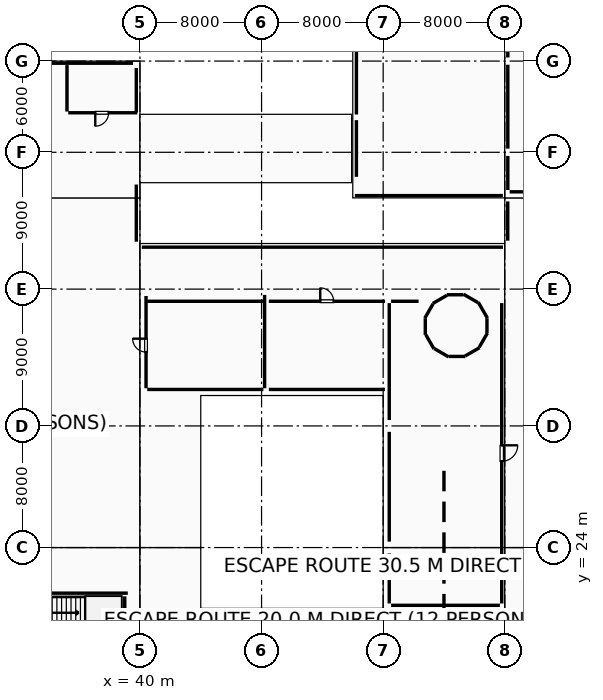
"""IFC4 building model, lengths in metres.
Left out: names, types, materials, properties, quantities, classifications, styles, units other than length and angle.
Written with IfcOpenShell. Run it as: python <this file> out.ifc"""

import sys

from ifc_helpers import new_model, si_unit, direction, frame, frame_2d, origin, origin_2d, place, context, subcontext, project, spatial, rectangle, hollow_rectangle, i_section, extrude, element, fill, save


model = new_model("IFC4")
c1 = context("Model", 3, precision=1e-05, world=origin(), true_north=direction((0.0, 1.0)))
c2 = subcontext(c1, "Body", "Model", "MODEL_VIEW")
j1 = project(units=[si_unit("LENGTHUNIT", "METRE"), si_unit("PLANEANGLEUNIT", "RADIAN")], contexts=[c1])
p1 = place(None, origin())
s1 = spatial("IfcSite", under=j1, at=p1, CompositionType="ELEMENT")
p2 = place(p1, origin())
s2 = spatial("IfcBuilding", under=s1, at=p2, CompositionType="ELEMENT")
p3 = place(p2, frame((0.0, 0.0, 5.4)))
s3 = spatial("IfcBuildingStorey", under=s2, at=p3, CompositionType="ELEMENT", Elevation=5.4)
for number, where, z_axis, x_axis in (
    (1, (40.0, 24.0, 0.0), (0.0, 0.0, 1.0), (1.0, 0.0, 0.0)),
    (2, (40.0, 32.0, 0.0), (0.0, 0.0, 1.0), (1.0, 0.0, 0.0)),
    (3, (40.0, 41.0, 0.0), (0.0, 0.0, 1.0), (1.0, 0.0, 0.0)),
    (4, (40.0, 50.0, 0.0), (0.0, 0.0, 1.0), (1.0, 0.0, 0.0)),
    (5, (40.0, 56.0, 0.0), (0.0, 0.0, 1.0), (1.0, 0.0, 0.0)),
):
    element("IfcColumn", number, at=place(p3, frame(where, z_axis=z_axis, x_axis=x_axis)), inside=s3, PredefinedType="COLUMN", context=c2, shape_type="SweptSolid", body=[
        extrude(rectangle(XDim=0.9, YDim=0.9, at=origin_2d()), origin(), (0.0, 0.0, 1.0), 4.8),
    ])
for number, where, z_axis, x_axis in (
    (6, (48.0, 41.0, 0.0), (0.0, 0.0, 1.0), (1.0, 0.0, 0.0)),
    (7, (56.0, 24.0, 0.0), (0.0, 0.0, 1.0), (1.0, 0.0, 0.0)),
    (8, (56.0, 32.0, 0.0), (0.0, 0.0, 1.0), (1.0, 0.0, 0.0)),
    (9, (56.0, 41.0, 0.0), (0.0, 0.0, 1.0), (1.0, 0.0, 0.0)),
):
    element("IfcColumn", number, at=place(p3, frame(where, z_axis=z_axis, x_axis=x_axis)), inside=s3, PredefinedType="COLUMN", context=c2, shape_type="SweptSolid", body=[
        extrude(rectangle(XDim=0.75, YDim=0.75, at=origin_2d()), origin(), (0.0, 0.0, 1.0), 4.8),
    ])
for number, where, z_axis, x_axis in (
    (10, (56.0, 50.0, 0.0), (0.0, 0.0, 1.0), (1.0, 0.0, 0.0)),
    (11, (56.0, 56.0, 0.0), (0.0, 0.0, 1.0), (1.0, 0.0, 0.0)),
):
    element("IfcColumn", number, at=place(p3, frame(where, z_axis=z_axis, x_axis=x_axis)), inside=s3, PredefinedType="COLUMN", context=c2, shape_type="SweptSolid", body=[
        extrude(rectangle(XDim=0.9, YDim=0.9, at=origin_2d()), origin(), (0.0, 0.0, 1.0), 4.8),
    ])
p4 = place(p3, frame((64.0, 50.0, 0.0), z_axis=(0.0, 0.0, 1.0), x_axis=(1.0, 0.0, 0.0)))
e12 = element("IfcColumn", 12, at=p4, inside=s3, PredefinedType="COLUMN", context=c2, shape_type="SweptSolid", body=[
    extrude(hollow_rectangle(XDim=0.45, YDim=0.45, WallThickness=0.02, at=origin_2d()), origin(), (0.0, 0.0, 1.0), 4.8),
])
p5 = place(p3, frame((64.0, 56.0, 0.0), z_axis=(0.0, 0.0, 1.0), x_axis=(1.0, 0.0, 0.0)))
e13 = element("IfcColumn", 13, at=p5, inside=s3, PredefinedType="COLUMN", context=c2, shape_type="SweptSolid", body=[
    extrude(i_section(OverallWidth=0.25, OverallDepth=0.45, WebThickness=0.011, FlangeThickness=0.014, FilletRadius=0.015, at=origin_2d()), origin(), (0.0, 0.0, 1.0), 4.8),
])
for number, where, z_axis, x_axis in (
    (14, (40.0, 48.2, 0.0), (0.0, 0.0, 1.0), (1.0, 0.0, 0.0)),
    (15, (54.0, 48.2, 0.0), (0.0, 0.0, 1.0), (1.0, 0.0, 0.0)),
    (16, (40.0, 52.3, 0.0), (0.0, 0.0, 1.0), (1.0, 0.0, 0.0)),
    (17, (54.0, 52.3, 0.0), (0.0, 0.0, 1.0), (1.0, 0.0, 0.0)),
):
    element("IfcColumn", number, at=place(p3, frame(where, z_axis=z_axis, x_axis=x_axis)), inside=s3, PredefinedType="COLUMN", context=c2, shape_type="SweptSolid", body=[
        extrude(i_section(OverallWidth=0.25, OverallDepth=0.35, WebThickness=0.01, FlangeThickness=0.012, FilletRadius=0.012, at=origin_2d()), origin(), (0.0, 0.0, 1.0), 4.8),
    ])
p6 = place(p3, frame((64.0, 47.0, 0.0), z_axis=(0.0, 0.0, 1.0), x_axis=(1.0, 0.0, 0.0)))
e18 = element("IfcColumn", 18, at=p6, inside=s3, PredefinedType="COLUMN", context=c2, shape_type="SweptSolid", body=[
    extrude(i_section(OverallWidth=0.25, OverallDepth=0.45, WebThickness=0.011, FlangeThickness=0.014, FilletRadius=0.015, at=origin_2d()), origin(), (0.0, 0.0, 1.0), 4.8),
])
p7 = place(p3, frame((39.76, 47.88, 0.0), z_axis=(0.0, 0.0, 1.0), x_axis=(0.0, -1.0, 0.0)))
e19 = element("IfcWall", 19, at=p7, inside=s3, PredefinedType="PARAPET", context=c2, shape_type="SweptSolid", body=[
    extrude(rectangle(XDim=3.76, YDim=0.18, at=frame_2d((1.88, 0.0))), origin(), (0.0, 0.0, 1.0), 0.88),
])
p8 = place(p3, frame((40.12, 43.76, 0.0), z_axis=(0.0, 0.0, 1.0), x_axis=(1.0, 0.0, 0.0)))
e20 = element("IfcWall", 20, at=p8, inside=s3, PredefinedType="PARAPET", context=c2, shape_type="SweptSolid", body=[
    extrude(rectangle(XDim=23.76, YDim=0.18, at=frame_2d((11.88, 0.0))), origin(), (0.0, 0.0, 1.0), 0.88),
])
p9 = place(p3, frame((64.195, 44.185, 0.0), z_axis=(0.0, 0.0, 1.0), x_axis=(0.0, 1.0, 0.0)))
e21 = element("IfcWall", 21, at=p9, inside=s3, PredefinedType="STANDARD", context=c2, shape_type="SweptSolid", body=[
    extrude(rectangle(XDim=2.582, YDim=0.35, at=frame_2d((1.291, 0.0))), origin(), (0.0, 0.0, 1.0), 3.725),
])
p10 = place(p3, frame((63.876, 47.15, 0.0), z_axis=(0.0, 0.0, 1.0), x_axis=(-1.0, 0.0, 0.0)))
e22 = element("IfcWall", 22, at=p10, inside=s3, PredefinedType="ELEMENTEDWALL", context=c2, shape_type="SweptSolid", body=[
    extrude(rectangle(XDim=9.736, YDim=0.26, at=frame_2d((4.868, 0.0))), origin(), (0.0, 0.0, 1.0), 4.54),
])
p11 = place(p10, frame((4.426, 0.0, 0.95)))
e23 = element("IfcOpeningElement", 23, at=p11, cuts=e22, PredefinedType="OPENING", context=c2, shape_type="SweptSolid", body=[
    extrude(rectangle(XDim=0.9, YDim=2.1, at=frame_2d((0.45, 1.05))), frame((0.0, 0.14, 0.0), z_axis=(0.0, -1.0, 0.0), x_axis=(1.0, 0.0, 0.0)), (0.0, 0.0, 1.0), 0.28),
])
p12 = place(p3, frame((54.24, 48.385, 0.0), z_axis=(0.0, 0.0, 1.0), x_axis=(0.0, 1.0, 0.0)))
e24 = element("IfcWall", 24, at=p12, inside=s3, PredefinedType="PARAPET", context=c2, shape_type="SweptSolid", body=[
    extrude(rectangle(XDim=3.73, YDim=0.18, at=frame_2d((1.865, 0.0))), origin(), (0.0, 0.0, 1.0), 0.88),
])
p13 = place(p3, frame((54.24, 52.485, 0.0), z_axis=(0.0, 0.0, 1.0), x_axis=(0.0, 1.0, 0.0)))
e25 = element("IfcWall", 25, at=p13, inside=s3, PredefinedType="PARAPET", context=c2, shape_type="SweptSolid", body=[
    extrude(rectangle(XDim=13.03, YDim=0.18, at=frame_2d((6.515, 0.0))), origin(), (0.0, 0.0, 1.0), 0.88),
])
p14 = place(p3, frame((32.383, 55.86, 0.0), z_axis=(0.0, 0.0, 1.0), x_axis=(1.0, 0.0, 0.0)))
e26 = element("IfcWall", 26, at=p14, inside=s3, PredefinedType="ELEMENTEDWALL", context=c2, shape_type="SweptSolid", body=[
    extrude(rectangle(XDim=7.159, YDim=0.24, at=frame_2d((3.58, 0.0))), origin(), (0.0, 0.0, 1.0), 3.675),
])
p15 = place(p3, frame((39.76, 55.54, 0.0), z_axis=(0.0, 0.0, 1.0), x_axis=(0.0, -1.0, 0.0)))
e27 = element("IfcWall", 27, at=p15, inside=s3, PredefinedType="PARAPET", context=c2, shape_type="SweptSolid", body=[
    extrude(rectangle(XDim=2.92, YDim=0.18, at=frame_2d((1.46, 0.0))), origin(), (0.0, 0.0, 1.0), 0.88),
])
p16 = place(p3, frame((39.2, 21.0, 0.0), z_axis=(0.0, 0.0, 1.0), x_axis=(-1.0, 0.0, 0.0)))
e28 = element("IfcWall", 28, at=p16, inside=s3, PredefinedType="SHEAR", context=c2, shape_type="SweptSolid", body=[
    extrude(rectangle(XDim=8.926, YDim=0.4, at=frame_2d((4.463, 0.0))), origin(), (0.0, 0.0, 1.0), 4.54),
])
p17 = place(p3, frame((39.0, 12.41, 0.0), z_axis=(0.0, 0.0, 1.0), x_axis=(0.0, 1.0, 0.0)))
e29 = element("IfcWall", 29, at=p17, inside=s3, PredefinedType="SHEAR", context=c2, shape_type="SweptSolid", body=[
    extrude(rectangle(XDim=8.38, YDim=0.4, at=frame_2d((4.19, 0.0))), origin(), (0.0, 0.0, 1.0), 4.54),
])
p18 = place(p3, frame((62.861, 39.086, 0.0), z_axis=(0.0, 0.0, 1.0), x_axis=(-0.499930512259, 0.866065518833, 0.0)))
e30 = element("IfcWall", 30, at=p18, inside=s3, PredefinedType="SHEAR", context=c2, shape_type="SweptSolid", body=[
    extrude(rectangle(XDim=1.219, YDim=0.35, at=frame_2d((0.609, 0.0))), origin(), (0.0, 0.0, 1.0), 4.54),
])
for number, where, z_axis, x_axis in (
    (31, (62.233, 40.115, 0.0), (0.0, 0.0, 1.0), (-0.866, 0.5, 0.0)),
    (32, (61.283, 40.628, 0.0), (0.0, 0.0, 1.0), (-1.0, 0.0, 0.0)),
    (33, (60.205, 40.598, 0.0), (0.0, 0.0, 1.0), (-0.866, -0.5, 0.0)),
    (34, (59.285, 40.033, 0.0), (0.0, 0.0, 1.0), (-0.5, -0.866, 0.0)),
    (35, (58.771, 39.083, 0.0), (0.0, 0.0, 1.0), (0.0, -1.0, 0.0)),
    (36, (58.802, 38.004, 0.0), (0.0, 0.0, 1.0), (0.5, -0.866, 0.0)),
):
    element("IfcWall", number, at=place(p3, frame(where, z_axis=z_axis, x_axis=x_axis)), inside=s3, PredefinedType="SHEAR", context=c2, shape_type="SweptSolid", body=[
        extrude(rectangle(XDim=1.093, YDim=0.35, at=frame_2d((0.546, 0.0))), origin(), (0.0, 0.0, 1.0), 4.54),
    ])
p19 = place(p3, frame((59.367, 37.085, 0.0), z_axis=(0.0, 0.0, 1.0), x_axis=(0.866021955858, -0.500005971936, 0.0)))
e37 = element("IfcWall", 37, at=p19, inside=s3, PredefinedType="SHEAR", context=c2, shape_type="SweptSolid", body=[
    extrude(rectangle(XDim=1.093, YDim=0.35, at=frame_2d((0.547, 0.0))), origin(), (0.0, 0.0, 1.0), 4.54),
])
for number, where, z_axis, x_axis in (
    (38, (60.316, 36.572, 0.0), (0.0, 0.0, 1.0), (1.0, 0.0, 0.0)),
    (39, (61.396, 36.602, 0.0), (0.0, 0.0, 1.0), (0.866, 0.5, 0.0)),
    (40, (62.315, 37.167, 0.0), (0.0, 0.0, 1.0), (0.5, 0.866, 0.0)),
):
    element("IfcWall", number, at=place(p3, frame(where, z_axis=z_axis, x_axis=x_axis)), inside=s3, PredefinedType="SHEAR", context=c2, shape_type="SweptSolid", body=[
        extrude(rectangle(XDim=1.093, YDim=0.35, at=frame_2d((0.546, 0.0))), origin(), (0.0, 0.0, 1.0), 4.54),
    ])
p20 = place(p3, frame((62.828, 38.116, 0.0), z_axis=(0.0, 0.0, 1.0), x_axis=(0.0, 1.0, 0.0)))
e41 = element("IfcWall", 41, at=p20, inside=s3, PredefinedType="SHEAR", context=c2, shape_type="SweptSolid", body=[
    extrude(rectangle(XDim=0.967, YDim=0.35, at=frame_2d((0.483, 0.0))), origin(), (0.0, 0.0, 1.0), 4.54),
])
p21 = place(p3, frame((40.52, 19.6, 0.0), z_axis=(0.0, 0.0, 1.0), x_axis=(1.0, 0.0, 0.0)))
e42 = element("IfcWall", 42, at=p21, inside=s3, PredefinedType="PARTITIONING", context=c2, shape_type="SweptSolid", body=[
    extrude(rectangle(XDim=23.16, YDim=0.2, at=frame_2d((11.58, 0.0))), origin(), (0.0, 0.0, 1.0), 4.53),
])
p22 = place(p3, frame((40.4, 16.465, 0.0), z_axis=(0.0, 0.0, 1.0), x_axis=(0.0, 1.0, 0.0)))
e43 = element("IfcWall", 43, at=p22, inside=s3, PredefinedType="PARTITIONING", context=c2, shape_type="SweptSolid", body=[
    extrude(rectangle(XDim=3.015, YDim=0.2, at=frame_2d((1.507, 0.0))), origin(), (0.0, 0.0, 1.0), 4.53),
])
p23 = place(p3, frame((56.52, 40.2, 0.0), z_axis=(0.0, 0.0, 1.0), x_axis=(1.0, 0.0, 0.0)))
e44 = element("IfcWall", 44, at=p23, inside=s3, PredefinedType="PARTITIONING", context=c2, shape_type="SweptSolid", body=[
    extrude(rectangle(XDim=1.81, YDim=0.2, at=frame_2d((0.905, 0.0))), origin(), (0.0, 0.0, 1.0), 4.53),
])
p24 = place(p3, frame((63.8, 40.08, 0.0), z_axis=(0.0, 0.0, 1.0), x_axis=(0.0, -1.0, 0.0)))
e45 = element("IfcWall", 45, at=p24, inside=s3, PredefinedType="PARTITIONING", context=c2, shape_type="SweptSolid", body=[
    extrude(rectangle(XDim=19.76, YDim=0.2, at=frame_2d((9.88, 0.0))), origin(), (0.0, 0.0, 1.0), 3.72),
])
p25 = place(p24, frame((9.355, 0.0, 0.0)))
e46 = element("IfcOpeningElement", 46, at=p25, cuts=e45, PredefinedType="OPENING", context=c2, shape_type="SweptSolid", body=[
    extrude(rectangle(XDim=1.05, YDim=2.15, at=frame_2d((0.525, 1.075))), frame((0.0, 0.11, 0.0), z_axis=(0.0, -1.0, 0.0), x_axis=(1.0, 0.0, 0.0)), (0.0, 0.0, 1.0), 0.22),
])
p26 = place(p3, frame((63.68, 20.2, 0.0), z_axis=(0.0, 0.0, 1.0), x_axis=(-1.0, 0.0, 0.0)))
e47 = element("IfcWall", 47, at=p26, inside=s3, PredefinedType="PARTITIONING", context=c2, shape_type="SweptSolid", body=[
    extrude(rectangle(XDim=7.16, YDim=0.2, at=frame_2d((3.58, 0.0))), origin(), (0.0, 0.0, 1.0), 4.53),
])
p27 = place(p3, frame((56.4, 20.32, 0.0), z_axis=(0.0, 0.0, 1.0), x_axis=(0.0, 1.0, 0.0)))
e48 = element("IfcWall", 48, at=p27, inside=s3, PredefinedType="PARTITIONING", context=c2, shape_type="SweptSolid", body=[
    extrude(rectangle(XDim=3.29, YDim=0.2, at=frame_2d((1.645, 0.0))), origin(), (0.0, 0.0, 1.0), 4.53),
])
p28 = place(p3, frame((56.4, 24.39, 0.0), z_axis=(0.0, 0.0, 1.0), x_axis=(0.0, 1.0, 0.0)))
e49 = element("IfcWall", 49, at=p28, inside=s3, PredefinedType="PARTITIONING", context=c2, shape_type="SweptSolid", body=[
    extrude(rectangle(XDim=7.22, YDim=0.2, at=frame_2d((3.61, 0.0))), origin(), (0.0, 0.0, 1.0), 3.52),
])
p29 = place(p3, frame((56.4, 32.39, 0.0), z_axis=(0.0, 0.0, 1.0), x_axis=(0.0, 1.0, 0.0)))
e50 = element("IfcWall", 50, at=p29, inside=s3, PredefinedType="PARTITIONING", context=c2, shape_type="SweptSolid", body=[
    extrude(rectangle(XDim=7.69, YDim=0.2, at=frame_2d((3.845, 0.0))), origin(), (0.0, 0.0, 1.0), 3.67),
])
p30 = place(p3, frame((71.66, 47.4, 0.0), z_axis=(0.0, 0.0, 1.0), x_axis=(-1.0, 0.0, 0.0)))
e51 = element("IfcWall", 51, at=p30, inside=s3, PredefinedType="PARTITIONING", context=c2, shape_type="SweptSolid", body=[
    extrude(rectangle(XDim=7.34, YDim=0.2, at=frame_2d((3.67, 0.0))), origin(), (0.0, 0.0, 1.0), 3.72),
])
p31 = place(p3, frame((64.2, 47.52, 0.0), z_axis=(0.0, 0.0, 1.0), x_axis=(0.0, 1.0, 0.0)))
e52 = element("IfcWall", 52, at=p31, inside=s3, PredefinedType="PARTITIONING", context=c2, shape_type="SweptSolid", body=[
    extrude(rectangle(XDim=2.24, YDim=0.2, at=frame_2d((1.12, 0.0))), origin(), (0.0, 0.0, 1.0), 3.92),
])
p32 = place(p3, frame((64.2, 50.24, 0.0), z_axis=(0.0, 0.0, 1.0), x_axis=(0.0, 1.0, 0.0)))
e53 = element("IfcWall", 53, at=p32, inside=s3, PredefinedType="PARTITIONING", context=c2, shape_type="SweptSolid", body=[
    extrude(rectangle(XDim=5.52, YDim=0.2, at=frame_2d((2.76, 0.0))), origin(), (0.0, 0.0, 1.0), 3.97),
])
p33 = place(p3, frame((64.2, 56.24, 0.0), z_axis=(0.0, 0.0, 1.0), x_axis=(0.0, 1.0, 0.0)))
e54 = element("IfcWall", 54, at=p33, inside=s3, PredefinedType="PARTITIONING", context=c2, shape_type="SweptSolid", body=[
    extrude(rectangle(XDim=8.52, YDim=0.2, at=frame_2d((4.26, 0.0))), origin(), (0.0, 0.0, 1.0), 4.02),
])
p34 = place(p3, frame((40.48, 40.2, 0.0), z_axis=(0.0, 0.0, 1.0), x_axis=(1.0, 0.0, 0.0)))
e55 = element("IfcWall", 55, at=p34, inside=s3, PredefinedType="PARTITIONING", context=c2, shape_type="SweptSolid", body=[
    extrude(rectangle(XDim=7.64, YDim=0.12, at=frame_2d((3.82, 0.0))), origin(), (0.0, 0.0, 1.0), 4.53),
])
p35 = place(p3, frame((48.2, 40.621, 0.0), z_axis=(0.0, 0.0, 1.0), x_axis=(0.0, -1.0, 0.0)))
e56 = element("IfcWall", 56, at=p35, inside=s3, PredefinedType="PARTITIONING", context=c2, shape_type="SweptSolid", body=[
    extrude(rectangle(XDim=6.141, YDim=0.12, at=frame_2d((3.071, 0.0))), origin(), (0.0, 0.0, 1.0), 4.53),
])
p36 = place(p3, frame((48.12, 34.4, 0.0), z_axis=(0.0, 0.0, 1.0), x_axis=(-1.0, 0.0, 0.0)))
e57 = element("IfcWall", 57, at=p36, inside=s3, PredefinedType="PARTITIONING", context=c2, shape_type="SweptSolid", body=[
    extrude(rectangle(XDim=7.64, YDim=0.12, at=frame_2d((3.82, 0.0))), origin(), (0.0, 0.0, 1.0), 4.53),
])
p37 = place(p3, frame((40.4, 34.48, 0.0), z_axis=(0.0, 0.0, 1.0), x_axis=(0.0, 1.0, 0.0)))
e58 = element("IfcWall", 58, at=p37, inside=s3, PredefinedType="PARTITIONING", context=c2, shape_type="SweptSolid", body=[
    extrude(rectangle(XDim=6.066, YDim=0.12, at=frame_2d((3.033, 0.0))), origin(), (0.0, 0.0, 1.0), 4.53),
])
p38 = place(p37, frame((2.38, 0.0, 0.0)))
e59 = element("IfcOpeningElement", 59, at=p38, cuts=e58, PredefinedType="OPENING", context=c2, shape_type="SweptSolid", body=[
    extrude(rectangle(XDim=0.88, YDim=2.1, at=frame_2d((0.44, 1.05))), frame((0.0, 0.07, 0.0), z_axis=(0.0, -1.0, 0.0), x_axis=(1.0, 0.0, 0.0)), (0.0, 0.0, 1.0), 0.14),
])
p39 = place(p3, frame((48.48, 40.2, 0.0), z_axis=(0.0, 0.0, 1.0), x_axis=(1.0, 0.0, 0.0)))
e60 = element("IfcWall", 60, at=p39, inside=s3, PredefinedType="PARTITIONING", context=c2, shape_type="SweptSolid", body=[
    extrude(rectangle(XDim=7.64, YDim=0.12, at=frame_2d((3.82, 0.0))), origin(), (0.0, 0.0, 1.0), 4.53),
])
p40 = place(p39, frame((3.38, 0.0, 0.0)))
e61 = element("IfcOpeningElement", 61, at=p40, cuts=e60, PredefinedType="OPENING", context=c2, shape_type="SweptSolid", body=[
    extrude(rectangle(XDim=0.88, YDim=2.1, at=frame_2d((0.44, 1.05))), frame((0.0, 0.07, 0.0), z_axis=(0.0, -1.0, 0.0), x_axis=(1.0, 0.0, 0.0)), (0.0, 0.0, 1.0), 0.14),
])
p41 = place(p3, frame((56.12, 34.4, 0.0), z_axis=(0.0, 0.0, 1.0), x_axis=(-1.0, 0.0, 0.0)))
e62 = element("IfcWall", 62, at=p41, inside=s3, PredefinedType="PARTITIONING", context=c2, shape_type="SweptSolid", body=[
    extrude(rectangle(XDim=7.64, YDim=0.12, at=frame_2d((3.82, 0.0))), origin(), (0.0, 0.0, 1.0), 4.53),
])
p42 = place(p3, frame((39.826, 52.6, 0.0), z_axis=(0.0, 0.0, 1.0), x_axis=(-1.0, 0.0, 0.0)))
e63 = element("IfcWall", 63, at=p42, inside=s3, PredefinedType="PARTITIONING", context=c2, shape_type="SweptSolid", body=[
    extrude(rectangle(XDim=4.546, YDim=0.12, at=frame_2d((2.273, 0.0))), origin(), (0.0, 0.0, 1.0), 4.53),
])
p43 = place(p42, frame((1.886, 0.0, 0.0)))
e64 = element("IfcOpeningElement", 64, at=p43, cuts=e63, PredefinedType="OPENING", context=c2, shape_type="SweptSolid", body=[
    extrude(rectangle(XDim=0.88, YDim=2.1, at=frame_2d((0.44, 1.05))), frame((0.0, 0.07, 0.0), z_axis=(0.0, -1.0, 0.0), x_axis=(1.0, 0.0, 0.0)), (0.0, 0.0, 1.0), 0.14),
])
p44 = place(p3, frame((35.2, 52.68, 0.0), z_axis=(0.0, 0.0, 1.0), x_axis=(0.0, 1.0, 0.0)))
e65 = element("IfcWall", 65, at=p44, inside=s3, PredefinedType="PARTITIONING", context=c2, shape_type="SweptSolid", body=[
    extrude(rectangle(XDim=3.056, YDim=0.12, at=frame_2d((1.528, 0.0))), origin(), (0.0, 0.0, 1.0), 4.53),
])
p45 = place(p11, origin())
e66 = element("IfcWindow", 66, at=p45, inside=s3, PartitioningType="SINGLE_PANEL", PredefinedType="WINDOW", context=c2, shape_type="SweptSolid", body=[
    extrude(rectangle(XDim=0.9, YDim=2.1, at=frame_2d((0.45, 1.05))), frame((0.0, 0.03, 0.0), z_axis=(0.0, -1.0, 0.0), x_axis=(1.0, 0.0, 0.0)), (0.0, 0.0, 1.0), 0.06),
])
fill(e23, e66)
p46 = place(p25, origin())
e67 = element("IfcDoor", 67, at=p46, inside=s3, OperationType="SINGLE_SWING_LEFT", PredefinedType="DOOR", context=c2, shape_type="SweptSolid", body=[
    extrude(rectangle(XDim=1.05, YDim=2.15, at=frame_2d((0.525, 1.075))), frame((0.0, 0.025, 0.0), z_axis=(0.0, -1.0, 0.0), x_axis=(1.0, 0.0, 0.0)), (0.0, 0.0, 1.0), 0.05),
])
fill(e46, e67)
p47 = place(p38, origin())
e68 = element("IfcDoor", 68, at=p47, inside=s3, OperationType="SINGLE_SWING_RIGHT", PredefinedType="DOOR", context=c2, shape_type="SweptSolid", body=[
    extrude(rectangle(XDim=0.88, YDim=2.1, at=frame_2d((0.44, 1.05))), frame((0.0, 0.025, 0.0), z_axis=(0.0, -1.0, 0.0), x_axis=(1.0, 0.0, 0.0)), (0.0, 0.0, 1.0), 0.05),
])
fill(e59, e68)
p48 = place(p40, origin())
e69 = element("IfcDoor", 69, at=p48, inside=s3, OperationType="SINGLE_SWING_LEFT", PredefinedType="DOOR", context=c2, shape_type="SweptSolid", body=[
    extrude(rectangle(XDim=0.88, YDim=2.1, at=frame_2d((0.44, 1.05))), frame((0.0, 0.025, 0.0), z_axis=(0.0, -1.0, 0.0), x_axis=(1.0, 0.0, 0.0)), (0.0, 0.0, 1.0), 0.05),
])
fill(e61, e69)
p49 = place(p43, origin())
e70 = element("IfcDoor", 70, at=p49, inside=s3, OperationType="SINGLE_SWING_RIGHT", PredefinedType="DOOR", context=c2, shape_type="SweptSolid", body=[
    extrude(rectangle(XDim=0.88, YDim=2.1, at=frame_2d((0.44, 1.05))), frame((0.0, 0.025, 0.0), z_axis=(0.0, -1.0, 0.0), x_axis=(1.0, 0.0, 0.0)), (0.0, 0.0, 1.0), 0.05),
])
fill(e64, e70)
save(model, sys.argv[1])
